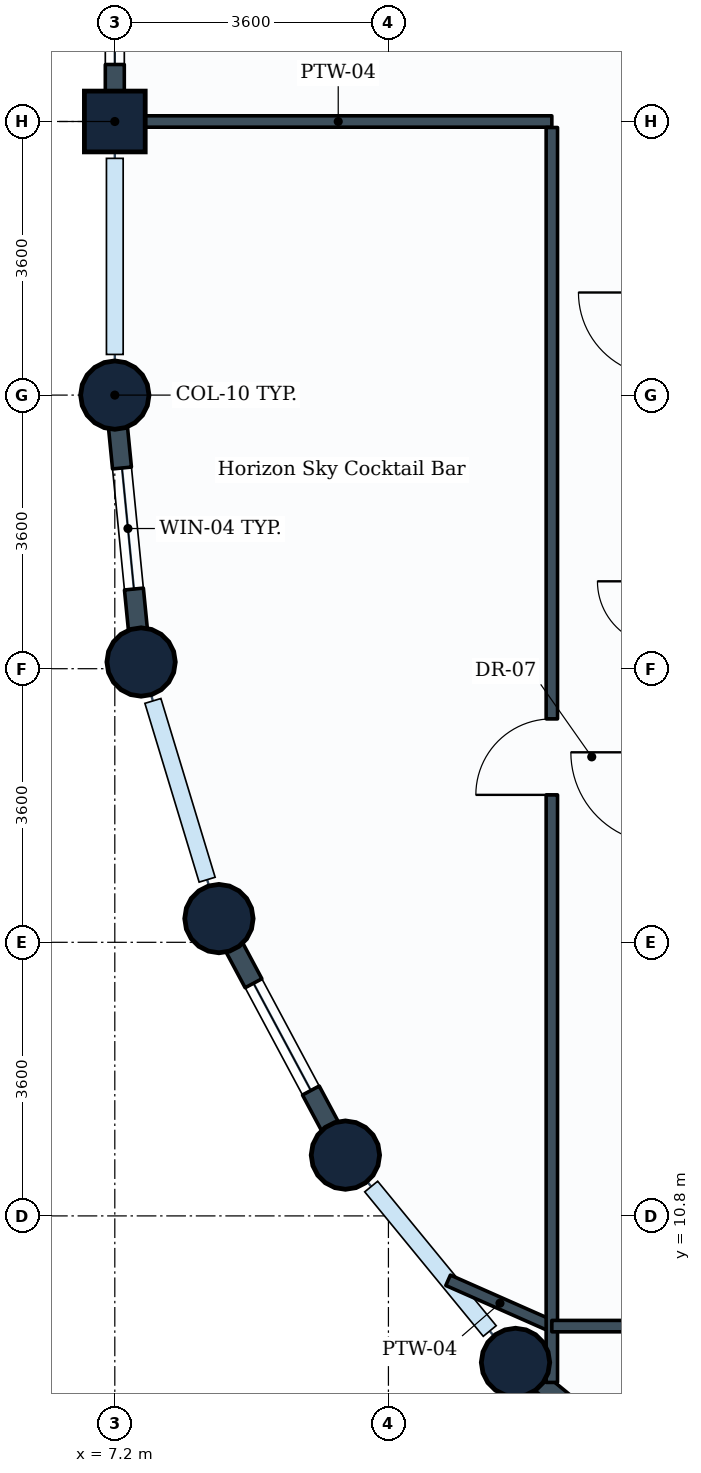
"""IFC4 building model, lengths in metres.
Left out: names, types, materials, properties, quantities, classifications, styles, units other than length and angle.
Written with IfcOpenShell. Run it as: python <this file> out.ifc"""

import sys

from ifc_helpers import new_model, si_unit, direction, frame, frame_2d, origin, origin_2d, place, context, subcontext, project, spatial, rectangle, circle, extrude, element, fill, save


model = new_model("IFC4")
c1 = context("Model", 3, precision=1e-05, world=origin(), true_north=direction((0.0, 1.0)))
c2 = subcontext(c1, "Body", "Model", "MODEL_VIEW")
j1 = project(units=[si_unit("LENGTHUNIT", "METRE"), si_unit("PLANEANGLEUNIT", "RADIAN")], contexts=[c1])
p1 = place(None, origin())
s1 = spatial("IfcSite", under=j1, at=p1, CompositionType="ELEMENT")
p2 = place(p1, origin())
s2 = spatial("IfcBuilding", under=s1, at=p2, CompositionType="ELEMENT")
p3 = place(p2, frame((0.0, 0.0, 291.8)))
s3 = spatial("IfcBuildingStorey", under=s2, at=p3, CompositionType="ELEMENT", Elevation=291.8)
p4 = place(p3, frame((7.2, 21.6, 0.0), z_axis=(0.0, 0.0, 1.0), x_axis=(1.0, 0.0, 0.0)))
e1 = element("IfcColumn", 1, at=p4, inside=s3, PredefinedType="COLUMN", context=c2, shape_type="SweptSolid", body=[
    extrude(circle(Radius=0.45, at=origin_2d()), origin(), (0.0, 0.0, 1.0), 3.6),
])
p5 = place(p3, frame((7.2, 25.2, 0.0), z_axis=(0.0, 0.0, 1.0), x_axis=(0.0, 1.0, 0.0)))
e2 = element("IfcColumn", 2, at=p5, inside=s3, PredefinedType="COLUMN", context=c2, shape_type="SweptSolid", body=[
    extrude(rectangle(XDim=0.8, YDim=0.8, at=origin_2d()), origin(), (0.0, 0.0, 1.0), 3.6),
])
for number, where, z_axis, x_axis in (
    (3, (7.546, 18.088, 0.0), (0.0, 0.0, 1.0), (1.0, 0.0, 0.0)),
    (4, (8.57, 14.712, 0.0), (0.0, 0.0, 1.0), (1.0, 0.0, 0.0)),
    (5, (10.234, 11.6, 0.0), (0.0, 0.0, 1.0), (1.0, 0.0, 0.0)),
    (6, (12.472, 8.872, 0.0), (0.0, 0.0, 1.0), (1.0, 0.0, 0.0)),
):
    element("IfcColumn", number, at=place(p3, frame(where, z_axis=z_axis, x_axis=x_axis)), inside=s3, PredefinedType="COLUMN", context=c2, shape_type="SweptSolid", body=[
        extrude(circle(Radius=0.45, at=origin_2d()), origin(), (0.0, 0.0, 1.0), 3.6),
    ])
p6 = place(p3, frame((7.2, 25.2, 0.0), z_axis=(0.0, 0.0, 1.0), x_axis=(0.0, 1.0, 0.0)))
e7 = element("IfcWall", 7, at=p6, inside=s3, PredefinedType="STANDARD", context=c2, shape_type="SweptSolid", body=[
    extrude(rectangle(XDim=3.6, YDim=0.25, at=frame_2d((1.8, 0.0))), origin(), (0.0, 0.0, 1.0), 2.83),
])
p7 = place(p6, frame((0.75, 0.0, 0.85)))
e8 = element("IfcOpeningElement", 8, at=p7, cuts=e7, PredefinedType="OPENING", context=c2, shape_type="SweptSolid", body=[
    extrude(rectangle(XDim=2.1, YDim=1.35, at=frame_2d((1.05, 0.675))), frame((0.0, 0.135, 0.0), z_axis=(0.0, -1.0, 0.0), x_axis=(1.0, 0.0, 0.0)), (0.0, 0.0, 1.0), 0.27),
])
p8 = place(p3, frame((7.546, 18.088, 0.0), z_axis=(0.0, 0.0, 1.0), x_axis=(-0.09802417461, 0.995184033831, 0.0)))
e9 = element("IfcWall", 9, at=p8, inside=s3, PredefinedType="STANDARD", context=c2, shape_type="SweptSolid", body=[
    extrude(rectangle(XDim=3.529, YDim=0.25, at=frame_2d((1.765, 0.0))), origin(), (0.0, 0.0, 1.0), 2.83),
])
p9 = place(p8, frame((0.965, 0.0, 0.85)))
e10 = element("IfcOpeningElement", 10, at=p9, cuts=e9, PredefinedType="OPENING", context=c2, shape_type="SweptSolid", body=[
    extrude(rectangle(XDim=1.6, YDim=1.35, at=frame_2d((0.8, 0.675))), frame((0.0, 0.135, 0.0), z_axis=(0.0, -1.0, 0.0), x_axis=(1.0, 0.0, 0.0)), (0.0, 0.0, 1.0), 0.27),
])
p10 = place(p3, frame((10.234, 11.6, 0.0), z_axis=(0.0, 0.0, 1.0), x_axis=(-0.47151087309, 0.881860247748, 0.0)))
e11 = element("IfcWall", 11, at=p10, inside=s3, PredefinedType="STANDARD", context=c2, shape_type="SweptSolid", body=[
    extrude(rectangle(XDim=3.529, YDim=0.25, at=frame_2d((1.764, 0.0))), origin(), (0.0, 0.0, 1.0), 2.83),
])
p11 = place(p10, frame((0.964, 0.0, 0.85)))
e12 = element("IfcOpeningElement", 12, at=p11, cuts=e11, PredefinedType="OPENING", context=c2, shape_type="SweptSolid", body=[
    extrude(rectangle(XDim=1.6, YDim=1.35, at=frame_2d((0.8, 0.675))), frame((0.0, 0.135, 0.0), z_axis=(0.0, -1.0, 0.0), x_axis=(1.0, 0.0, 0.0)), (0.0, 0.0, 1.0), 0.27),
])
p12 = place(p3, frame((15.2, 6.634, 0.0), z_axis=(0.0, 0.0, 1.0), x_axis=(-0.773121216285, 0.634258295121, 0.0)))
e13 = element("IfcWall", 13, at=p12, inside=s3, PredefinedType="STANDARD", context=c2, shape_type="SweptSolid", body=[
    extrude(rectangle(XDim=3.529, YDim=0.25, at=frame_2d((1.764, 0.0))), origin(), (0.0, 0.0, 1.0), 2.83),
])
p13 = place(p12, frame((0.964, 0.0, 0.85)))
e14 = element("IfcOpeningElement", 14, at=p13, cuts=e13, PredefinedType="OPENING", context=c2, shape_type="SweptSolid", body=[
    extrude(rectangle(XDim=1.6, YDim=1.35, at=frame_2d((0.8, 0.675))), frame((0.0, 0.135, 0.0), z_axis=(0.0, -1.0, 0.0), x_axis=(1.0, 0.0, 0.0)), (0.0, 0.0, 1.0), 0.27),
])
p14 = place(p3, frame((7.329, 25.2, 0.0), z_axis=(0.0, 0.0, 1.0), x_axis=(1.0, 0.0, 0.0)))
e15 = element("IfcWall", 15, at=p14, inside=s3, PredefinedType="PARTITIONING", context=c2, shape_type="SweptSolid", body=[
    extrude(rectangle(XDim=5.621, YDim=0.15, at=frame_2d((2.811, 0.0))), origin(), (0.0, 0.0, 1.0), 3.335),
])
p15 = place(p3, frame((12.95, 9.35, 0.0), z_axis=(0.0, 0.0, 1.0), x_axis=(-0.914773794999, 0.403966463934, 0.0)))
e16 = element("IfcWall", 16, at=p15, inside=s3, PredefinedType="PARTITIONING", context=c2, shape_type="SweptSolid", body=[
    extrude(rectangle(XDim=1.492, YDim=0.15, at=frame_2d((0.746, 0.0))), origin(), (0.0, 0.0, 1.0), 2.83),
])
p16 = place(p3, frame((12.95, 8.609, 0.0), z_axis=(0.0, 0.0, 1.0), x_axis=(0.0, 1.0, 0.0)))
e17 = element("IfcWall", 17, at=p16, inside=s3, PredefinedType="PARTITIONING", context=c2, shape_type="SweptSolid", body=[
    extrude(rectangle(XDim=16.512, YDim=0.15, at=frame_2d((8.256, 0.0))), origin(), (0.0, 0.0, 1.0), 2.83),
])
p17 = place(p16, frame((7.731, 0.0, 0.0)))
e18 = element("IfcOpeningElement", 18, at=p17, cuts=e17, PredefinedType="OPENING", context=c2, shape_type="SweptSolid", body=[
    extrude(rectangle(XDim=1.0, YDim=2.1, at=frame_2d((0.5, 1.05))), frame((0.0, 0.085, 0.0), z_axis=(0.0, -1.0, 0.0), x_axis=(1.0, 0.0, 0.0)), (0.0, 0.0, 1.0), 0.17),
])
p18 = place(p3, frame((12.95, 9.35, 0.0), z_axis=(0.0, 0.0, 1.0), x_axis=(1.0, 0.0, 0.0)))
e19 = element("IfcWall", 19, at=p18, inside=s3, PredefinedType="PARTITIONING", context=c2, shape_type="SweptSolid", body=[
    extrude(rectangle(XDim=15.771, YDim=0.15, at=frame_2d((7.885, 0.0))), origin(), (0.0, 0.0, 1.0), 3.02),
])
p19 = place(p18, frame((4.836, 0.0, 0.0)))
e20 = element("IfcOpeningElement", 20, at=p19, cuts=e19, PredefinedType="OPENING", context=c2, shape_type="SweptSolid", body=[
    extrude(rectangle(XDim=1.0, YDim=2.1, at=frame_2d((0.5, 1.05))), frame((0.0, 0.085, 0.0), z_axis=(0.0, -1.0, 0.0), x_axis=(1.0, 0.0, 0.0)), (0.0, 0.0, 1.0), 0.17),
])
p20 = place(p7, origin())
e21 = element("IfcWindow", 21, at=p20, inside=s3, PartitioningType="SINGLE_PANEL", PredefinedType="WINDOW", context=c2, shape_type="SweptSolid", body=[
    extrude(rectangle(XDim=2.1, YDim=1.35, at=frame_2d((1.05, 0.675))), frame((0.0, 0.03, 0.0), z_axis=(0.0, -1.0, 0.0), x_axis=(1.0, 0.0, 0.0)), (0.0, 0.0, 1.0), 0.06),
])
fill(e8, e21)
p21 = place(p9, origin())
e22 = element("IfcWindow", 22, at=p21, inside=s3, PartitioningType="SINGLE_PANEL", PredefinedType="WINDOW", context=c2, shape_type="SweptSolid", body=[
    extrude(rectangle(XDim=1.6, YDim=1.35, at=frame_2d((0.8, 0.675))), frame((0.0, 0.03, 0.0), z_axis=(0.0, -1.0, 0.0), x_axis=(1.0, 0.0, 0.0)), (0.0, 0.0, 1.0), 0.06),
])
fill(e10, e22)
p22 = place(p11, origin())
e23 = element("IfcWindow", 23, at=p22, inside=s3, PartitioningType="SINGLE_PANEL", PredefinedType="WINDOW", context=c2, shape_type="SweptSolid", body=[
    extrude(rectangle(XDim=1.6, YDim=1.35, at=frame_2d((0.8, 0.675))), frame((0.0, 0.03, 0.0), z_axis=(0.0, -1.0, 0.0), x_axis=(1.0, 0.0, 0.0)), (0.0, 0.0, 1.0), 0.06),
])
fill(e12, e23)
p23 = place(p17, origin())
e24 = element("IfcDoor", 24, at=p23, inside=s3, OperationType="SINGLE_SWING_LEFT", PredefinedType="DOOR", context=c2, shape_type="SweptSolid", body=[
    extrude(rectangle(XDim=1.0, YDim=2.1, at=frame_2d((0.5, 1.05))), frame((0.0, 0.025, 0.0), z_axis=(0.0, -1.0, 0.0), x_axis=(1.0, 0.0, 0.0)), (0.0, 0.0, 1.0), 0.05),
])
fill(e18, e24)
save(model, sys.argv[1])
